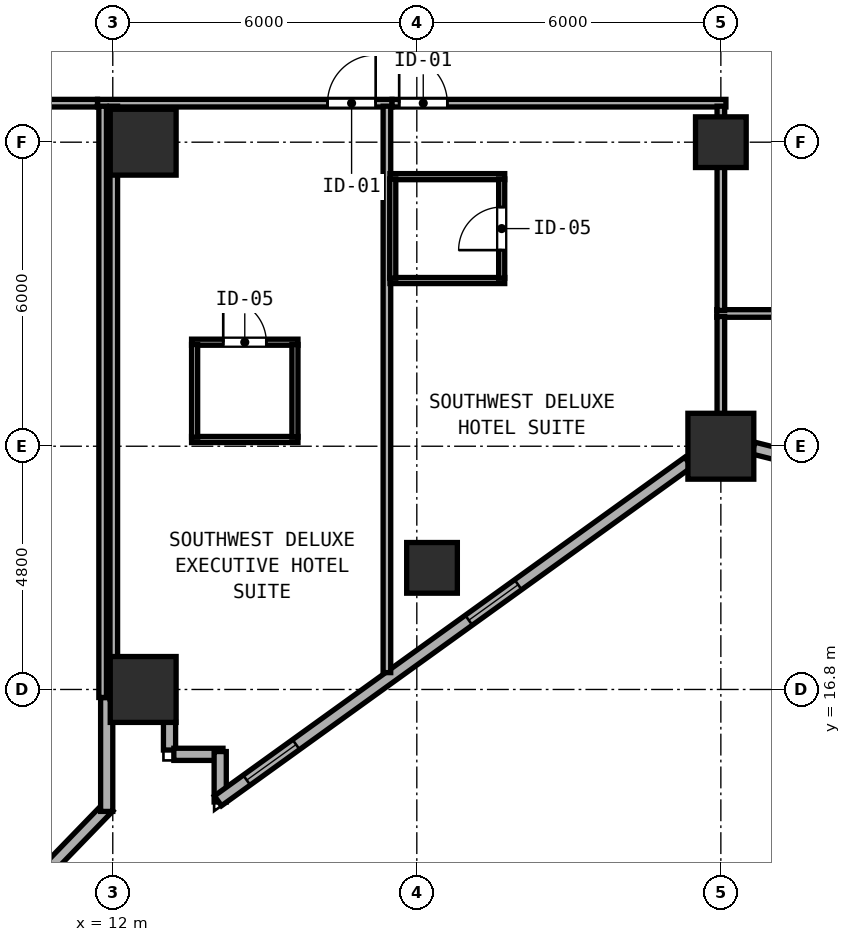
"""IFC4 building model, lengths in metres.
Left out: names, types, materials, properties, quantities, classifications, styles, units other than length and angle.
Written with IfcOpenShell. Run it as: python <this file> out.ifc"""

import sys

from ifc_helpers import new_model, si_unit, direction, frame, frame_2d, origin, origin_2d, place, context, subcontext, project, spatial, rectangle, hollow_rectangle, extrude, element, fill, save


model = new_model("IFC4")
c1 = context("Model", 3, precision=1e-05, world=origin(), true_north=direction((0.0, 1.0)))
c2 = subcontext(c1, "Body", "Model", "MODEL_VIEW")
j1 = project(units=[si_unit("LENGTHUNIT", "METRE"), si_unit("PLANEANGLEUNIT", "RADIAN")], contexts=[c1])
p1 = place(None, origin())
s1 = spatial("IfcSite", under=j1, at=p1, CompositionType="ELEMENT")
p2 = place(p1, origin())
s2 = spatial("IfcBuilding", under=s1, at=p2, CompositionType="ELEMENT")
p3 = place(p2, frame((0.0, 0.0, 35.4)))
s3 = spatial("IfcBuildingStorey", under=s2, at=p3, CompositionType="ELEMENT", Elevation=35.4)
for number, where, z_axis, x_axis in (
    (1, (24.0, 21.6, 0.0), (0.0, 0.0, 1.0), (1.0, 0.0, 0.0)),
    (2, (12.6, 16.8, 0.0), (0.0, 0.0, 1.0), (1.0, 0.0, 0.0)),
    (3, (12.6, 27.6, 0.0), (0.0, 0.0, 1.0), (1.0, 0.0, 0.0)),
):
    element("IfcColumn", number, at=place(p3, frame(where, z_axis=z_axis, x_axis=x_axis)), inside=s3, PredefinedType="COLUMN", context=c2, shape_type="SweptSolid", body=[
        extrude(hollow_rectangle(XDim=1.3, YDim=1.3, WallThickness=0.048, at=origin_2d()), origin(), (0.0, 0.0, 1.0), 3.8),
    ])
for number, where, z_axis, x_axis in (
    (4, (24.0, 27.6, 0.0), (0.0, 0.0, 1.0), (1.0, 0.0, 0.0)),
    (5, (18.3, 19.2, 0.0), (0.0, 0.0, 1.0), (1.0, 0.0, 0.0)),
):
    element("IfcColumn", number, at=place(p3, frame(where, z_axis=z_axis, x_axis=x_axis)), inside=s3, PredefinedType="COLUMN", context=c2, shape_type="SweptSolid", body=[
        extrude(hollow_rectangle(XDim=1.0, YDim=1.0, WallThickness=0.038, at=origin_2d()), origin(), (0.0, 0.0, 1.0), 3.8),
    ])
p4 = place(p3, frame((4.813, 7.148, 0.0), z_axis=(0.0, 0.0, 1.0), x_axis=(0.695506215319, 0.718520079366, 0.0)))
e6 = element("IfcWall", 6, at=p4, inside=s3, PredefinedType="SOLIDWALL", context=c2, shape_type="SweptSolid", body=[
    extrude(rectangle(XDim=10.216, YDim=0.24, at=frame_2d((5.108, 0.0))), origin(), (0.0, 0.0, 1.0), 3.6),
])
p5 = place(p4, frame((0.7, 0.0, 0.85)))
e7 = element("IfcOpeningElement", 7, at=p5, cuts=e6, PredefinedType="OPENING", context=c2, shape_type="SweptSolid", body=[
    extrude(rectangle(XDim=1.2, YDim=1.85, at=frame_2d((0.6, 0.925))), frame((0.0, 0.13, 0.0), z_axis=(0.0, -1.0, 0.0), x_axis=(1.0, 0.0, 0.0)), (0.0, 0.0, 1.0), 0.26),
])
p6 = place(p4, frame((6.1, 0.0, 0.85)))
e8 = element("IfcOpeningElement", 8, at=p6, cuts=e6, PredefinedType="OPENING", context=c2, shape_type="SweptSolid", body=[
    extrude(rectangle(XDim=1.2, YDim=1.85, at=frame_2d((0.6, 0.925))), frame((0.0, 0.13, 0.0), z_axis=(0.0, -1.0, 0.0), x_axis=(1.0, 0.0, 0.0)), (0.0, 0.0, 1.0), 0.26),
])
p7 = place(p3, frame((11.88, 14.394, 0.0), z_axis=(0.0, 0.0, 1.0), x_axis=(0.0, 1.0, 0.0)))
e9 = element("IfcWall", 9, at=p7, inside=s3, PredefinedType="SOLIDWALL", context=c2, shape_type="SweptSolid", body=[
    extrude(rectangle(XDim=2.246, YDim=0.24, at=frame_2d((1.123, 0.0))), origin(), (0.0, 0.0, 1.0), 3.6),
])
p8 = place(p3, frame((13.12, 16.158, 0.0), z_axis=(0.0, 0.0, 1.0), x_axis=(0.0, -1.0, 0.0)))
e10 = element("IfcWall", 10, at=p8, inside=s3, PredefinedType="SOLIDWALL", context=c2, shape_type="SweptSolid", body=[
    extrude(rectangle(XDim=0.553, YDim=0.24, at=frame_2d((0.276, 0.0))), origin(), (0.0, 0.0, 1.0), 3.6),
])
p9 = place(p3, frame((13.205, 15.52, 0.0), z_axis=(0.0, 0.0, 1.0), x_axis=(1.0, 0.0, 0.0)))
e11 = element("IfcWall", 11, at=p9, inside=s3, PredefinedType="SOLIDWALL", context=c2, shape_type="SweptSolid", body=[
    extrude(rectangle(XDim=0.97, YDim=0.24, at=frame_2d((0.485, 0.0))), origin(), (0.0, 0.0, 1.0), 3.6),
])
p10 = place(p3, frame((14.12, 15.575, 0.0), z_axis=(0.0, 0.0, 1.0), x_axis=(0.0, -1.0, 0.0)))
e12 = element("IfcWall", 12, at=p10, inside=s3, PredefinedType="SOLIDWALL", context=c2, shape_type="SweptSolid", body=[
    extrude(rectangle(XDim=0.996, YDim=0.24, at=frame_2d((0.498, 0.0))), origin(), (0.0, 0.0, 1.0), 3.6),
])
p11 = place(p3, frame((14.075, 14.602, 0.0), z_axis=(0.0, 0.0, 1.0), x_axis=(0.811535555989, 0.584303038984, 0.0)))
e13 = element("IfcWall", 13, at=p11, inside=s3, PredefinedType="SOLIDWALL", context=c2, shape_type="SweptSolid", body=[
    extrude(rectangle(XDim=11.438, YDim=0.24, at=frame_2d((5.719, 0.0))), origin(), (0.0, 0.0, 1.0), 3.097),
])
p12 = place(p11, frame((0.7, 0.0, 0.85)))
e14 = element("IfcOpeningElement", 14, at=p12, cuts=e13, PredefinedType="OPENING", context=c2, shape_type="SweptSolid", body=[
    extrude(rectangle(XDim=1.2, YDim=1.85, at=frame_2d((0.6, 0.925))), frame((0.0, 0.13, 0.0), z_axis=(0.0, -1.0, 0.0), x_axis=(1.0, 0.0, 0.0)), (0.0, 0.0, 1.0), 0.26),
])
p13 = place(p11, frame((6.1, 0.0, 0.85)))
e15 = element("IfcOpeningElement", 15, at=p13, cuts=e13, PredefinedType="OPENING", context=c2, shape_type="SweptSolid", body=[
    extrude(rectangle(XDim=1.2, YDim=1.85, at=frame_2d((0.6, 0.925))), frame((0.0, 0.13, 0.0), z_axis=(0.0, -1.0, 0.0), x_axis=(1.0, 0.0, 0.0)), (0.0, 0.0, 1.0), 0.26),
])
p14 = place(p3, frame((24.642, 21.563, 0.0), z_axis=(0.0, 0.0, 1.0), x_axis=(0.970135906278, -0.242561998982, 0.0)))
e16 = element("IfcWall", 16, at=p14, inside=s3, PredefinedType="SOLIDWALL", context=c2, shape_type="SweptSolid", body=[
    extrude(rectangle(XDim=4.356, YDim=0.24, at=frame_2d((2.178, 0.0))), origin(), (0.0, 0.0, 1.0), 3.097),
])
p15 = place(p14, frame((0.7, 0.0, 0.85)))
e17 = element("IfcOpeningElement", 17, at=p15, cuts=e16, PredefinedType="OPENING", context=c2, shape_type="SweptSolid", body=[
    extrude(rectangle(XDim=1.2, YDim=1.85, at=frame_2d((0.6, 0.925))), frame((0.0, 0.13, 0.0), z_axis=(0.0, -1.0, 0.0), x_axis=(1.0, 0.0, 0.0)), (0.0, 0.0, 1.0), 0.26),
])
p16 = place(p3, frame((23.92, 24.22, 0.0), z_axis=(0.0, 0.0, 1.0), x_axis=(1.0, 0.0, 0.0)))
e18 = element("IfcWall", 18, at=p16, inside=s3, PredefinedType="PARTITIONING", context=c2, shape_type="SweptSolid", body=[
    extrude(rectangle(XDim=7.36, YDim=0.15, at=frame_2d((3.68, 0.0))), origin(), (0.0, 0.0, 1.0), 3.6),
])
p17 = place(p16, frame((5.845, 0.0, 0.0), z_axis=(0.0, 0.0, 1.0), x_axis=(-1.0, 0.0, 0.0)))
e19 = element("IfcOpeningElement", 19, at=p17, cuts=e18, PredefinedType="OPENING", context=c2, shape_type="SweptSolid", body=[
    extrude(rectangle(XDim=0.95, YDim=2.12, at=frame_2d((0.475, 1.06))), frame((0.0, 0.085, 0.0), z_axis=(0.0, -1.0, 0.0), x_axis=(1.0, 0.0, 0.0)), (0.0, 0.0, 1.0), 0.17),
])
p18 = place(p3, frame((24.0, 21.819, 0.0), z_axis=(0.0, 0.0, 1.0), x_axis=(0.0, 1.0, 0.0)))
e20 = element("IfcWall", 20, at=p18, inside=s3, PredefinedType="PARTITIONING", context=c2, shape_type="SweptSolid", body=[
    extrude(rectangle(XDim=2.341, YDim=0.15, at=frame_2d((1.171, 0.0))), origin(), (0.0, 0.0, 1.0), 3.097),
])
p19 = place(p3, frame((11.7, 28.37, 0.0), z_axis=(0.0, 0.0, 1.0), x_axis=(1.0, 0.0, 0.0)))
e21 = element("IfcWall", 21, at=p19, inside=s3, PredefinedType="PARTITIONING", context=c2, shape_type="SweptSolid", body=[
    extrude(rectangle(XDim=5.81, YDim=0.15, at=frame_2d((2.905, 0.0))), origin(), (0.0, 0.0, 1.0), 3.6),
])
p20 = place(p19, frame((5.488, 0.0, 0.0), z_axis=(0.0, 0.0, 1.0), x_axis=(-1.0, 0.0, 0.0)))
e22 = element("IfcOpeningElement", 22, at=p20, cuts=e21, PredefinedType="OPENING", context=c2, shape_type="SweptSolid", body=[
    extrude(rectangle(XDim=0.95, YDim=2.18, at=frame_2d((0.475, 1.09))), frame((0.0, 0.085, 0.0), z_axis=(0.0, -1.0, 0.0), x_axis=(1.0, 0.0, 0.0)), (0.0, 0.0, 1.0), 0.17),
])
p21 = place(p3, frame((11.8, 16.642, 0.0), z_axis=(0.0, 0.0, 1.0), x_axis=(0.0, 1.0, 0.0)))
e23 = element("IfcWall", 23, at=p21, inside=s3, PredefinedType="PARTITIONING", context=c2, shape_type="SweptSolid", body=[
    extrude(rectangle(XDim=11.668, YDim=0.15, at=frame_2d((5.834, 0.0))), origin(), (0.0, 0.0, 1.0), 3.6),
])
p22 = place(p3, frame((17.41, 17.133, 0.0), z_axis=(0.0, 0.0, 1.0), x_axis=(0.0, 1.0, 0.0)))
e24 = element("IfcWall", 24, at=p22, inside=s3, PredefinedType="PARTITIONING", context=c2, shape_type="SweptSolid", body=[
    extrude(rectangle(XDim=11.177, YDim=0.15, at=frame_2d((5.589, 0.0))), origin(), (0.0, 0.0, 1.0), 3.6),
])
p23 = place(p3, frame((13.555, 23.653, 0.0), z_axis=(0.0, 0.0, 1.0), x_axis=(1.0, 0.0, 0.0)))
e25 = element("IfcWall", 25, at=p23, inside=s3, PredefinedType="PARTITIONING", context=c2, shape_type="SweptSolid", body=[
    extrude(rectangle(XDim=2.1, YDim=0.12, at=frame_2d((1.05, 0.0))), origin(), (0.0, 0.0, 1.0), 3.6),
])
p24 = place(p23, frame((1.475, 0.0, 0.0), z_axis=(0.0, 0.0, 1.0), x_axis=(-1.0, 0.0, 0.0)))
e26 = element("IfcOpeningElement", 26, at=p24, cuts=e25, PredefinedType="OPENING", context=c2, shape_type="SweptSolid", body=[
    extrude(rectangle(XDim=0.85, YDim=2.1, at=frame_2d((0.425, 1.05))), frame((0.0, 0.07, 0.0), z_axis=(0.0, -1.0, 0.0), x_axis=(1.0, 0.0, 0.0)), (0.0, 0.0, 1.0), 0.14),
])
p25 = place(p3, frame((13.555, 21.733, 0.0), z_axis=(0.0, 0.0, 1.0), x_axis=(1.0, 0.0, 0.0)))
e27 = element("IfcWall", 27, at=p25, inside=s3, PredefinedType="PARTITIONING", context=c2, shape_type="SweptSolid", body=[
    extrude(rectangle(XDim=2.1, YDim=0.12, at=frame_2d((1.05, 0.0))), origin(), (0.0, 0.0, 1.0), 3.6),
])
for number, where, z_axis, x_axis in (
    (28, (13.615, 21.778, 0.0), (0.0, 0.0, 1.0), (0.0, 1.0, 0.0)),
    (29, (15.595, 21.778, 0.0), (0.0, 0.0, 1.0), (0.0, 1.0, 0.0)),
):
    element("IfcWall", number, at=place(p3, frame(where, z_axis=z_axis, x_axis=x_axis)), inside=s3, PredefinedType="PARTITIONING", context=c2, shape_type="SweptSolid", body=[
        extrude(rectangle(XDim=1.83, YDim=0.12, at=frame_2d((0.915, 0.0))), origin(), (0.0, 0.0, 1.0), 3.6),
    ])
p26 = place(p3, frame((17.512, 28.37, 0.0), z_axis=(0.0, 0.0, 1.0), x_axis=(1.0, 0.0, 0.0)))
e30 = element("IfcWall", 30, at=p26, inside=s3, PredefinedType="PARTITIONING", context=c2, shape_type="SweptSolid", body=[
    extrude(rectangle(XDim=6.588, YDim=0.15, at=frame_2d((3.294, 0.0))), origin(), (0.0, 0.0, 1.0), 3.6),
])
p27 = place(p26, frame((1.09, 0.0, 0.0), z_axis=(0.0, 0.0, 1.0), x_axis=(-1.0, 0.0, 0.0)))
e31 = element("IfcOpeningElement", 31, at=p27, cuts=e30, PredefinedType="OPENING", context=c2, shape_type="SweptSolid", body=[
    extrude(rectangle(XDim=0.95, YDim=2.18, at=frame_2d((0.475, 1.09))), frame((0.0, 0.085, 0.0), z_axis=(0.0, -1.0, 0.0), x_axis=(1.0, 0.0, 0.0)), (0.0, 0.0, 1.0), 0.17),
])
p28 = place(p3, frame((24.0, 24.28, 0.0), z_axis=(0.0, 0.0, 1.0), x_axis=(0.0, 1.0, 0.0)))
e32 = element("IfcWall", 32, at=p28, inside=s3, PredefinedType="PARTITIONING", context=c2, shape_type="SweptSolid", body=[
    extrude(rectangle(XDim=4.03, YDim=0.15, at=frame_2d((2.015, 0.0))), origin(), (0.0, 0.0, 1.0), 3.097),
])
p29 = place(p3, frame((17.47, 26.92, 0.0), z_axis=(0.0, 0.0, 1.0), x_axis=(1.0, 0.0, 0.0)))
e33 = element("IfcWall", 33, at=p29, inside=s3, PredefinedType="PARTITIONING", context=c2, shape_type="SweptSolid", body=[
    extrude(rectangle(XDim=2.265, YDim=0.12, at=frame_2d((1.133, 0.0))), origin(), (0.0, 0.0, 1.0), 3.6),
])
p30 = place(p3, frame((17.47, 24.87, 0.0), z_axis=(0.0, 0.0, 1.0), x_axis=(1.0, 0.0, 0.0)))
e34 = element("IfcWall", 34, at=p30, inside=s3, PredefinedType="PARTITIONING", context=c2, shape_type="SweptSolid", body=[
    extrude(rectangle(XDim=2.265, YDim=0.12, at=frame_2d((1.133, 0.0))), origin(), (0.0, 0.0, 1.0), 3.185),
])
p31 = place(p3, frame((17.525, 24.915, 0.0), z_axis=(0.0, 0.0, 1.0), x_axis=(0.0, 1.0, 0.0)))
e35 = element("IfcWall", 35, at=p31, inside=s3, PredefinedType="PARTITIONING", context=c2, shape_type="SweptSolid", body=[
    extrude(rectangle(XDim=1.96, YDim=0.12, at=frame_2d((0.98, 0.0))), origin(), (0.0, 0.0, 1.0), 3.6),
])
p32 = place(p3, frame((19.675, 24.915, 0.0), z_axis=(0.0, 0.0, 1.0), x_axis=(0.0, 1.0, 0.0)))
e36 = element("IfcWall", 36, at=p32, inside=s3, PredefinedType="PARTITIONING", context=c2, shape_type="SweptSolid", body=[
    extrude(rectangle(XDim=1.96, YDim=0.12, at=frame_2d((0.98, 0.0))), origin(), (0.0, 0.0, 1.0), 3.6),
])
p33 = place(p32, frame((0.555, 0.0, 0.0)))
e37 = element("IfcOpeningElement", 37, at=p33, cuts=e36, PredefinedType="OPENING", context=c2, shape_type="SweptSolid", body=[
    extrude(rectangle(XDim=0.85, YDim=2.1, at=frame_2d((0.425, 1.05))), frame((0.0, 0.07, 0.0), z_axis=(0.0, -1.0, 0.0), x_axis=(1.0, 0.0, 0.0)), (0.0, 0.0, 1.0), 0.14),
])
p34 = place(p3, frame((2.965, 28.37, 0.0), z_axis=(0.0, 0.0, 1.0), x_axis=(1.0, 0.0, 0.0)))
e38 = element("IfcWall", 38, at=p34, inside=s3, PredefinedType="PARTITIONING", context=c2, shape_type="SweptSolid", body=[
    extrude(rectangle(XDim=8.733, YDim=0.15, at=frame_2d((4.366, 0.0))), origin(), (0.0, 0.0, 1.0), 3.6),
])
p35 = place(p34, frame((5.159, 0.0, 0.0), z_axis=(0.0, 0.0, 1.0), x_axis=(-1.0, 0.0, 0.0)))
e39 = element("IfcOpeningElement", 39, at=p35, cuts=e38, PredefinedType="OPENING", context=c2, shape_type="SweptSolid", body=[
    extrude(rectangle(XDim=0.95, YDim=2.18, at=frame_2d((0.475, 1.09))), frame((0.0, 0.085, 0.0), z_axis=(0.0, -1.0, 0.0), x_axis=(1.0, 0.0, 0.0)), (0.0, 0.0, 1.0), 0.17),
])
p36 = place(p3, frame((12.02, 16.612, 0.0), z_axis=(0.0, 0.0, 1.0), x_axis=(0.0, 1.0, 0.0)))
e40 = element("IfcWall", 40, at=p36, inside=s3, PredefinedType="PARTITIONING", context=c2, shape_type="SweptSolid", body=[
    extrude(rectangle(XDim=11.698, YDim=0.15, at=frame_2d((5.849, 0.0))), origin(), (0.0, 0.0, 1.0), 3.6),
])
p37 = place(p12, origin())
e41 = element("IfcWindow", 41, at=p37, inside=s3, PartitioningType="SINGLE_PANEL", PredefinedType="WINDOW", context=c2, shape_type="SweptSolid", body=[
    extrude(rectangle(XDim=1.2, YDim=1.85, at=frame_2d((0.6, 0.925))), frame((0.0, 0.03, 0.0), z_axis=(0.0, -1.0, 0.0), x_axis=(1.0, 0.0, 0.0)), (0.0, 0.0, 1.0), 0.06),
])
fill(e14, e41)
p38 = place(p13, origin())
e42 = element("IfcWindow", 42, at=p38, inside=s3, PartitioningType="SINGLE_PANEL", PredefinedType="WINDOW", context=c2, shape_type="SweptSolid", body=[
    extrude(rectangle(XDim=1.2, YDim=1.85, at=frame_2d((0.6, 0.925))), frame((0.0, 0.03, 0.0), z_axis=(0.0, -1.0, 0.0), x_axis=(1.0, 0.0, 0.0)), (0.0, 0.0, 1.0), 0.06),
])
fill(e15, e42)
p39 = place(p20, origin())
e43 = element("IfcDoor", 43, at=p39, inside=s3, OperationType="SINGLE_SWING_LEFT", PredefinedType="DOOR", context=c2, shape_type="SweptSolid", body=[
    extrude(rectangle(XDim=0.95, YDim=2.18, at=frame_2d((0.475, 1.09))), frame((0.0, 0.025, 0.0), z_axis=(0.0, -1.0, 0.0), x_axis=(1.0, 0.0, 0.0)), (0.0, 0.0, 1.0), 0.05),
])
fill(e22, e43)
p40 = place(p24, origin())
e44 = element("IfcDoor", 44, at=p40, inside=s3, OperationType="SINGLE_SWING_RIGHT", PredefinedType="DOOR", context=c2, shape_type="SweptSolid", body=[
    extrude(rectangle(XDim=0.85, YDim=2.1, at=frame_2d((0.425, 1.05))), frame((0.0, 0.025, 0.0), z_axis=(0.0, -1.0, 0.0), x_axis=(1.0, 0.0, 0.0)), (0.0, 0.0, 1.0), 0.05),
])
fill(e26, e44)
p41 = place(p27, origin())
e45 = element("IfcDoor", 45, at=p41, inside=s3, OperationType="SINGLE_SWING_RIGHT", PredefinedType="DOOR", context=c2, shape_type="SweptSolid", body=[
    extrude(rectangle(XDim=0.95, YDim=2.18, at=frame_2d((0.475, 1.09))), frame((0.0, 0.025, 0.0), z_axis=(0.0, -1.0, 0.0), x_axis=(1.0, 0.0, 0.0)), (0.0, 0.0, 1.0), 0.05),
])
fill(e31, e45)
p42 = place(p33, origin())
e46 = element("IfcDoor", 46, at=p42, inside=s3, OperationType="SINGLE_SWING_LEFT", PredefinedType="DOOR", context=c2, shape_type="SweptSolid", body=[
    extrude(rectangle(XDim=0.85, YDim=2.1, at=frame_2d((0.425, 1.05))), frame((0.0, 0.025, 0.0), z_axis=(0.0, -1.0, 0.0), x_axis=(1.0, 0.0, 0.0)), (0.0, 0.0, 1.0), 0.05),
])
fill(e37, e46)
save(model, sys.argv[1])
